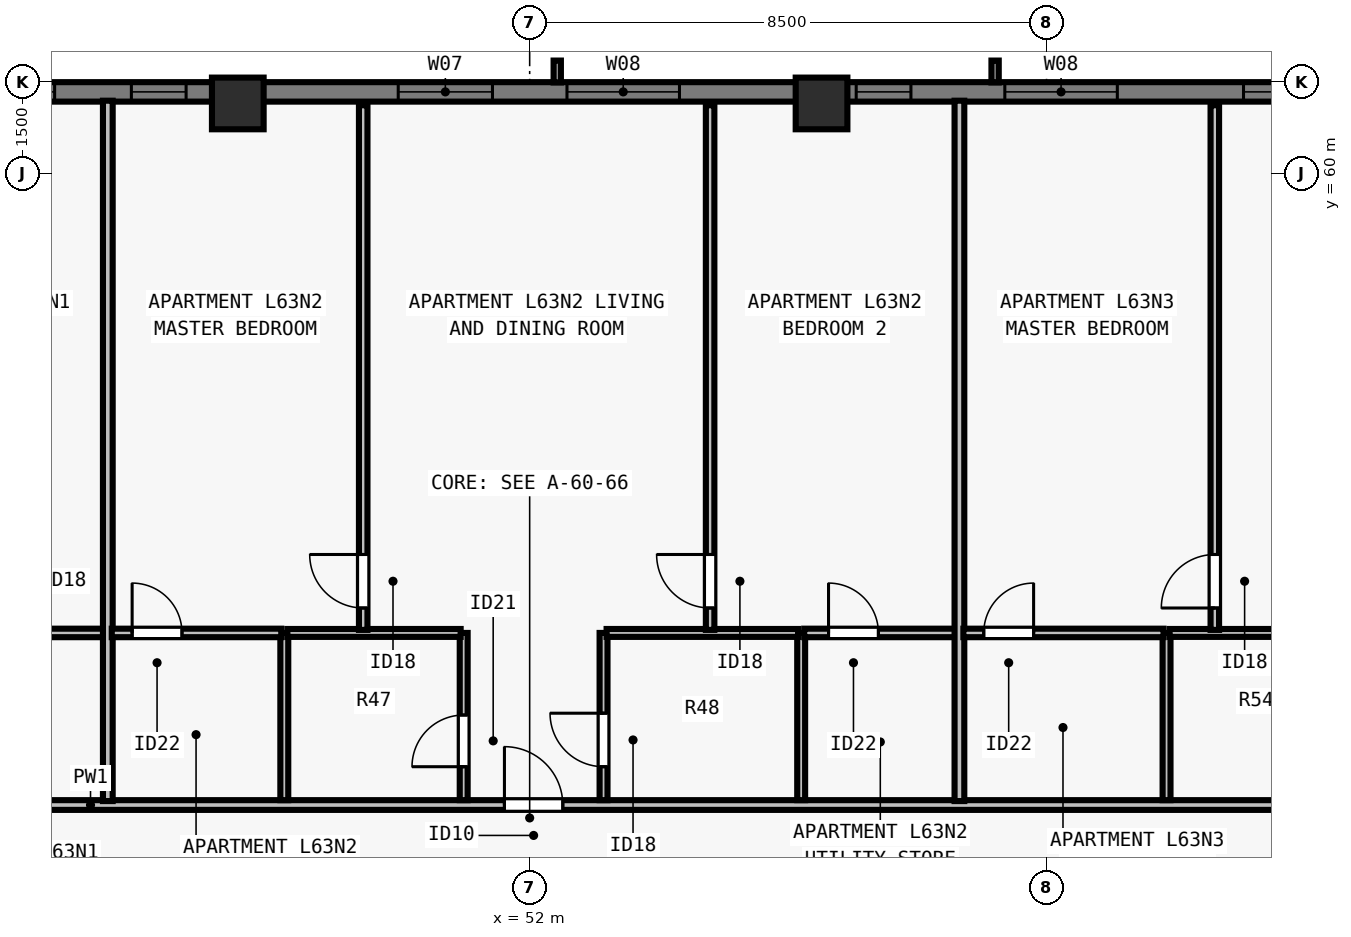
"""IFC4 building model, lengths in metres.
Left out: names, types, materials, properties, quantities, classifications, styles, units other than length and angle.
Written with IfcOpenShell. Run it as: python <this file> out.ifc"""

import sys

from ifc_helpers import new_model, si_unit, direction, frame, frame_2d, origin, origin_2d, place, context, subcontext, project, spatial, rectangle, extrude, element, fill, save


model = new_model("IFC4")
c1 = context("Model", 3, precision=1e-05, world=origin(), true_north=direction((0.0, 1.0)))
c2 = subcontext(c1, "Body", "Model", "MODEL_VIEW")
j1 = project(units=[si_unit("LENGTHUNIT", "METRE"), si_unit("PLANEANGLEUNIT", "RADIAN")], contexts=[c1])
p1 = place(None, origin())
s1 = spatial("IfcSite", under=j1, at=p1, CompositionType="ELEMENT")
p2 = place(p1, origin())
s2 = spatial("IfcBuilding", under=s1, at=p2, CompositionType="ELEMENT")
p3 = place(p2, frame((0.0, 0.0, 230.5)))
s3 = spatial("IfcBuildingStorey", under=s2, at=p3, CompositionType="ELEMENT", Elevation=230.5)
for number, where, z_axis, x_axis in (
    (1, (56.8, 61.15, 0.0), (0.0, 0.0, 1.0), (1.0, 0.0, 0.0)),
    (2, (47.2, 61.15, 0.0), (0.0, 0.0, 1.0), (1.0, 0.0, 0.0)),
):
    element("IfcColumn", number, at=place(p3, frame(where, z_axis=z_axis, x_axis=x_axis)), inside=s3, PredefinedType="COLUMN", context=c2, shape_type="SweptSolid", body=[
        extrude(rectangle(XDim=0.85, YDim=0.85, at=origin_2d()), origin(), (0.0, 0.0, 1.0), 3.5),
    ])
p4 = place(p3, frame((34.5, 61.34, 0.0), z_axis=(0.0, 0.0, 1.0), x_axis=(1.0, 0.0, 0.0)))
e3 = element("IfcWall", 3, at=p4, inside=s3, PredefinedType="SOLIDWALL", context=c2, shape_type="SweptSolid", body=[
    extrude(rectangle(XDim=34.702, YDim=0.32, at=frame_2d((17.351, 0.0))), origin(), (0.0, 0.0, 1.0), 3.29),
])
p5 = place(p4, frame((4.163, 0.0, 0.8)))
e4 = element("IfcOpeningElement", 4, at=p5, cuts=e3, PredefinedType="OPENING", context=c2, shape_type="SweptSolid", body=[
    extrude(rectangle(XDim=1.85, YDim=1.678, at=frame_2d((0.925, 0.839))), frame((0.0, 0.17, 0.0), z_axis=(0.0, -1.0, 0.0), x_axis=(1.0, 0.0, 0.0)), (0.0, 0.0, 1.0), 0.34),
])
p6 = place(p4, frame((8.138, 0.0, 0.8)))
e5 = element("IfcOpeningElement", 5, at=p6, cuts=e3, PredefinedType="OPENING", context=c2, shape_type="SweptSolid", body=[
    extrude(rectangle(XDim=1.55, YDim=1.678, at=frame_2d((0.775, 0.839))), frame((0.0, 0.17, 0.0), z_axis=(0.0, -1.0, 0.0), x_axis=(1.0, 0.0, 0.0)), (0.0, 0.0, 1.0), 0.34),
])
p7 = place(p4, frame((15.338, 0.0, 0.8)))
e6 = element("IfcOpeningElement", 6, at=p7, cuts=e3, PredefinedType="OPENING", context=c2, shape_type="SweptSolid", body=[
    extrude(rectangle(XDim=1.55, YDim=1.678, at=frame_2d((0.775, 0.839))), frame((0.0, 0.17, 0.0), z_axis=(0.0, -1.0, 0.0), x_axis=(1.0, 0.0, 0.0)), (0.0, 0.0, 1.0), 0.34),
])
p8 = place(p4, frame((18.114, 0.0, 0.8)))
e7 = element("IfcOpeningElement", 7, at=p8, cuts=e3, PredefinedType="OPENING", context=c2, shape_type="SweptSolid", body=[
    extrude(rectangle(XDim=1.85, YDim=1.678, at=frame_2d((0.925, 0.839))), frame((0.0, 0.17, 0.0), z_axis=(0.0, -1.0, 0.0), x_axis=(1.0, 0.0, 0.0)), (0.0, 0.0, 1.0), 0.34),
])
p9 = place(p4, frame((25.314, 0.0, 0.8)))
e8 = element("IfcOpeningElement", 8, at=p9, cuts=e3, PredefinedType="OPENING", context=c2, shape_type="SweptSolid", body=[
    extrude(rectangle(XDim=1.85, YDim=1.678, at=frame_2d((0.925, 0.839))), frame((0.0, 0.17, 0.0), z_axis=(0.0, -1.0, 0.0), x_axis=(1.0, 0.0, 0.0)), (0.0, 0.0, 1.0), 0.34),
])
p10 = place(p4, frame((29.24, 0.0, 0.8)))
e9 = element("IfcOpeningElement", 9, at=p10, cuts=e3, PredefinedType="OPENING", context=c2, shape_type="SweptSolid", body=[
    extrude(rectangle(XDim=1.55, YDim=1.678, at=frame_2d((0.775, 0.839))), frame((0.0, 0.17, 0.0), z_axis=(0.0, -1.0, 0.0), x_axis=(1.0, 0.0, 0.0)), (0.0, 0.0, 1.0), 0.34),
])
p11 = place(p4, frame((10.95, 0.0, 0.8)))
e10 = element("IfcOpeningElement", 10, at=p11, cuts=e3, PredefinedType="OPENING", context=c2, shape_type="SweptSolid", body=[
    extrude(rectangle(XDim=0.9, YDim=1.678, at=frame_2d((0.45, 0.839))), frame((0.0, 0.17, 0.0), z_axis=(0.0, -1.0, 0.0), x_axis=(1.0, 0.0, 0.0)), (0.0, 0.0, 1.0), 0.34),
])
p12 = place(p4, frame((22.87, 0.0, 0.8)))
e11 = element("IfcOpeningElement", 11, at=p12, cuts=e3, PredefinedType="OPENING", context=c2, shape_type="SweptSolid", body=[
    extrude(rectangle(XDim=0.9, YDim=1.678, at=frame_2d((0.45, 0.839))), frame((0.0, 0.17, 0.0), z_axis=(0.0, -1.0, 0.0), x_axis=(1.0, 0.0, 0.0)), (0.0, 0.0, 1.0), 0.34),
])
p13 = place(p3, frame((29.77, 49.613, 0.0), z_axis=(0.0, 0.0, 1.0), x_axis=(1.0, 0.0, 0.0)))
e12 = element("IfcWall", 12, at=p13, inside=s3, PredefinedType="PARTITIONING", context=c2, shape_type="SweptSolid", body=[
    extrude(rectangle(XDim=44.425, YDim=0.16, at=frame_2d((22.212, 0.0))), origin(), (0.0, 0.0, 1.0), 2.958),
])
p14 = place(p13, frame((7.241, 0.0, 0.0)))
e13 = element("IfcOpeningElement", 13, at=p14, cuts=e12, PredefinedType="OPENING", context=c2, shape_type="SweptSolid", body=[
    extrude(rectangle(XDim=0.96, YDim=2.18, at=frame_2d((0.48, 1.09))), frame((0.0, 0.09, 0.0), z_axis=(0.0, -1.0, 0.0), x_axis=(1.0, 0.0, 0.0)), (0.0, 0.0, 1.0), 0.18),
])
p15 = place(p13, frame((21.815, 0.0, 0.0)))
e14 = element("IfcOpeningElement", 14, at=p15, cuts=e12, PredefinedType="OPENING", context=c2, shape_type="SweptSolid", body=[
    extrude(rectangle(XDim=0.96, YDim=2.18, at=frame_2d((0.48, 1.09))), frame((0.0, 0.09, 0.0), z_axis=(0.0, -1.0, 0.0), x_axis=(1.0, 0.0, 0.0)), (0.0, 0.0, 1.0), 0.18),
])
p16 = place(p13, frame((36.324, 0.0, 0.0)))
e15 = element("IfcOpeningElement", 15, at=p16, cuts=e12, PredefinedType="OPENING", context=c2, shape_type="SweptSolid", body=[
    extrude(rectangle(XDim=0.96, YDim=2.18, at=frame_2d((0.48, 1.09))), frame((0.0, 0.09, 0.0), z_axis=(0.0, -1.0, 0.0), x_axis=(1.0, 0.0, 0.0)), (0.0, 0.0, 1.0), 0.18),
])
p17 = place(p3, frame((41.941, 52.442, 0.0), z_axis=(0.0, 0.0, 1.0), x_axis=(1.0, 0.0, 0.0)))
e16 = element("IfcWall", 16, at=p17, inside=s3, PredefinedType="PARTITIONING", context=c2, shape_type="SweptSolid", body=[
    extrude(rectangle(XDim=3.171, YDim=0.14, at=frame_2d((1.586, 0.0))), origin(), (0.0, 0.0, 1.0), 3.29),
])
p18 = place(p17, frame((0.4, 0.0, 0.0)))
e17 = element("IfcOpeningElement", 17, at=p18, cuts=e16, PredefinedType="OPENING", context=c2, shape_type="SweptSolid", body=[
    extrude(rectangle(XDim=0.82, YDim=2.1, at=frame_2d((0.41, 1.05))), frame((0.0, 0.08, 0.0), z_axis=(0.0, -1.0, 0.0), x_axis=(1.0, 0.0, 0.0)), (0.0, 0.0, 1.0), 0.16),
])
p19 = place(p3, frame((45.062, 49.677, 0.0), z_axis=(0.0, 0.0, 1.0), x_axis=(0.0, 1.0, 0.0)))
e18 = element("IfcWall", 18, at=p19, inside=s3, PredefinedType="PARTITIONING", context=c2, shape_type="SweptSolid", body=[
    extrude(rectangle(XDim=11.518, YDim=0.16, at=frame_2d((5.759, 0.0))), origin(), (0.0, 0.0, 1.0), 3.29),
])
p20 = place(p3, frame((47.965, 49.692, 0.0), z_axis=(0.0, 0.0, 1.0), x_axis=(0.0, 1.0, 0.0)))
e19 = element("IfcWall", 19, at=p20, inside=s3, PredefinedType="PLUMBINGWALL", context=c2, shape_type="SweptSolid", body=[
    extrude(rectangle(XDim=2.75, YDim=0.13, at=frame_2d((1.375, 0.0))), origin(), (0.0, 0.0, 1.0), 3.29),
])
p21 = place(p3, frame((50.915, 49.692, 0.0), z_axis=(0.0, 0.0, 1.0), x_axis=(0.0, 1.0, 0.0)))
e20 = element("IfcWall", 20, at=p21, inside=s3, PredefinedType="PLUMBINGWALL", context=c2, shape_type="SweptSolid", body=[
    extrude(rectangle(XDim=2.75, YDim=0.13, at=frame_2d((1.375, 0.0))), origin(), (0.0, 0.0, 1.0), 3.29),
])
p22 = place(p21, frame((0.55, 0.0, 0.0)))
e21 = element("IfcOpeningElement", 21, at=p22, cuts=e20, PredefinedType="OPENING", context=c2, shape_type="SweptSolid", body=[
    extrude(rectangle(XDim=0.85, YDim=2.08, at=frame_2d((0.425, 1.04))), frame((0.0, 0.075, 0.0), z_axis=(0.0, -1.0, 0.0), x_axis=(1.0, 0.0, 0.0)), (0.0, 0.0, 1.0), 0.15),
])
p23 = place(p3, frame((48.015, 52.442, 0.0), z_axis=(0.0, 0.0, 1.0), x_axis=(1.0, 0.0, 0.0)))
e22 = element("IfcWall", 22, at=p23, inside=s3, PredefinedType="PLUMBINGWALL", context=c2, shape_type="SweptSolid", body=[
    extrude(rectangle(XDim=2.85, YDim=0.13, at=frame_2d((1.425, 0.0))), origin(), (0.0, 0.0, 1.0), 3.29),
])
p24 = place(p3, frame((56.465, 49.692, 0.0), z_axis=(0.0, 0.0, 1.0), x_axis=(0.0, 1.0, 0.0)))
e23 = element("IfcWall", 23, at=p24, inside=s3, PredefinedType="PLUMBINGWALL", context=c2, shape_type="SweptSolid", body=[
    extrude(rectangle(XDim=2.75, YDim=0.13, at=frame_2d((1.375, 0.0))), origin(), (0.0, 0.0, 1.0), 3.29),
])
p25 = place(p3, frame((53.215, 49.692, 0.0), z_axis=(0.0, 0.0, 1.0), x_axis=(0.0, 1.0, 0.0)))
e24 = element("IfcWall", 24, at=p25, inside=s3, PredefinedType="PLUMBINGWALL", context=c2, shape_type="SweptSolid", body=[
    extrude(rectangle(XDim=2.75, YDim=0.13, at=frame_2d((1.375, 0.0))), origin(), (0.0, 0.0, 1.0), 3.29),
])
p26 = place(p25, frame((0.55, 0.0, 0.0)))
e25 = element("IfcOpeningElement", 25, at=p26, cuts=e24, PredefinedType="OPENING", context=c2, shape_type="SweptSolid", body=[
    extrude(rectangle(XDim=0.88, YDim=2.1, at=frame_2d((0.44, 1.05))), frame((0.0, 0.075, 0.0), z_axis=(0.0, -1.0, 0.0), x_axis=(1.0, 0.0, 0.0)), (0.0, 0.0, 1.0), 0.15),
])
p27 = place(p3, frame((53.265, 52.442, 0.0), z_axis=(0.0, 0.0, 1.0), x_axis=(1.0, 0.0, 0.0)))
e26 = element("IfcWall", 26, at=p27, inside=s3, PredefinedType="PLUMBINGWALL", context=c2, shape_type="SweptSolid", body=[
    extrude(rectangle(XDim=3.15, YDim=0.13, at=frame_2d((1.575, 0.0))), origin(), (0.0, 0.0, 1.0), 3.29),
])
p28 = place(p3, frame((49.262, 52.492, 0.0), z_axis=(0.0, 0.0, 1.0), x_axis=(0.0, 1.0, 0.0)))
e27 = element("IfcWall", 27, at=p28, inside=s3, PredefinedType="PARTITIONING", context=c2, shape_type="SweptSolid", body=[
    extrude(rectangle(XDim=8.628, YDim=0.14, at=frame_2d((4.314, 0.0))), origin(), (0.0, 0.0, 1.0), 3.29),
])
p29 = place(p28, frame((0.36, 0.0, 0.0)))
e28 = element("IfcOpeningElement", 28, at=p29, cuts=e27, PredefinedType="OPENING", context=c2, shape_type="SweptSolid", body=[
    extrude(rectangle(XDim=0.88, YDim=2.1, at=frame_2d((0.44, 1.05))), frame((0.0, 0.08, 0.0), z_axis=(0.0, -1.0, 0.0), x_axis=(1.0, 0.0, 0.0)), (0.0, 0.0, 1.0), 0.16),
])
p30 = place(p3, frame((45.127, 52.442, 0.0), z_axis=(0.0, 0.0, 1.0), x_axis=(1.0, 0.0, 0.0)))
e29 = element("IfcWall", 29, at=p30, inside=s3, PredefinedType="PARTITIONING", context=c2, shape_type="SweptSolid", body=[
    extrude(rectangle(XDim=2.788, YDim=0.14, at=frame_2d((1.394, 0.0))), origin(), (0.0, 0.0, 1.0), 3.29),
])
p31 = place(p30, frame((0.335, 0.0, 0.0)))
e30 = element("IfcOpeningElement", 30, at=p31, cuts=e29, PredefinedType="OPENING", context=c2, shape_type="SweptSolid", body=[
    extrude(rectangle(XDim=0.82, YDim=2.1, at=frame_2d((0.41, 1.05))), frame((0.0, 0.08, 0.0), z_axis=(0.0, -1.0, 0.0), x_axis=(1.0, 0.0, 0.0)), (0.0, 0.0, 1.0), 0.16),
])
p32 = place(p3, frame((54.968, 52.492, 0.0), z_axis=(0.0, 0.0, 1.0), x_axis=(0.0, 1.0, 0.0)))
e31 = element("IfcWall", 31, at=p32, inside=s3, PredefinedType="PARTITIONING", context=c2, shape_type="SweptSolid", body=[
    extrude(rectangle(XDim=8.628, YDim=0.14, at=frame_2d((4.314, 0.0))), origin(), (0.0, 0.0, 1.0), 2.958),
])
p33 = place(p32, frame((0.36, 0.0, 0.0)))
e32 = element("IfcOpeningElement", 32, at=p33, cuts=e31, PredefinedType="OPENING", context=c2, shape_type="SweptSolid", body=[
    extrude(rectangle(XDim=0.88, YDim=2.1, at=frame_2d((0.44, 1.05))), frame((0.0, 0.08, 0.0), z_axis=(0.0, -1.0, 0.0), x_axis=(1.0, 0.0, 0.0)), (0.0, 0.0, 1.0), 0.16),
])
p34 = place(p3, frame((56.515, 52.442, 0.0), z_axis=(0.0, 0.0, 1.0), x_axis=(1.0, 0.0, 0.0)))
e33 = element("IfcWall", 33, at=p34, inside=s3, PredefinedType="PARTITIONING", context=c2, shape_type="SweptSolid", body=[
    extrude(rectangle(XDim=2.603, YDim=0.14, at=frame_2d((1.301, 0.0))), origin(), (0.0, 0.0, 1.0), 3.29),
])
p35 = place(p34, frame((0.4, 0.0, 0.0)))
e34 = element("IfcOpeningElement", 34, at=p35, cuts=e33, PredefinedType="OPENING", context=c2, shape_type="SweptSolid", body=[
    extrude(rectangle(XDim=0.82, YDim=2.1, at=frame_2d((0.41, 1.05))), frame((0.0, 0.08, 0.0), z_axis=(0.0, -1.0, 0.0), x_axis=(1.0, 0.0, 0.0)), (0.0, 0.0, 1.0), 0.16),
])
p36 = place(p3, frame((59.067, 49.677, 0.0), z_axis=(0.0, 0.0, 1.0), x_axis=(0.0, 1.0, 0.0)))
e35 = element("IfcWall", 35, at=p36, inside=s3, PredefinedType="PARTITIONING", context=c2, shape_type="SweptSolid", body=[
    extrude(rectangle(XDim=11.518, YDim=0.16, at=frame_2d((5.759, 0.0))), origin(), (0.0, 0.0, 1.0), 3.29),
])
p37 = place(p3, frame((62.474, 49.692, 0.0), z_axis=(0.0, 0.0, 1.0), x_axis=(0.0, 1.0, 0.0)))
e36 = element("IfcWall", 36, at=p37, inside=s3, PredefinedType="PLUMBINGWALL", context=c2, shape_type="SweptSolid", body=[
    extrude(rectangle(XDim=2.75, YDim=0.13, at=frame_2d((1.375, 0.0))), origin(), (0.0, 0.0, 1.0), 2.573),
])
p38 = place(p3, frame((62.524, 52.442, 0.0), z_axis=(0.0, 0.0, 1.0), x_axis=(1.0, 0.0, 0.0)))
e37 = element("IfcWall", 37, at=p38, inside=s3, PredefinedType="PLUMBINGWALL", context=c2, shape_type="SweptSolid", body=[
    extrude(rectangle(XDim=2.85, YDim=0.13, at=frame_2d((1.425, 0.0))), origin(), (0.0, 0.0, 1.0), 3.29),
])
p39 = place(p3, frame((63.268, 52.492, 0.0), z_axis=(0.0, 0.0, 1.0), x_axis=(0.0, 1.0, 0.0)))
e38 = element("IfcWall", 38, at=p39, inside=s3, PredefinedType="PARTITIONING", context=c2, shape_type="SweptSolid", body=[
    extrude(rectangle(XDim=8.628, YDim=0.14, at=frame_2d((4.314, 0.0))), origin(), (0.0, 0.0, 1.0), 3.29),
])
p40 = place(p39, frame((0.36, 0.0, 0.0)))
e39 = element("IfcOpeningElement", 39, at=p40, cuts=e38, PredefinedType="OPENING", context=c2, shape_type="SweptSolid", body=[
    extrude(rectangle(XDim=0.88, YDim=2.1, at=frame_2d((0.44, 1.05))), frame((0.0, 0.08, 0.0), z_axis=(0.0, -1.0, 0.0), x_axis=(1.0, 0.0, 0.0)), (0.0, 0.0, 1.0), 0.16),
])
p41 = place(p3, frame((59.133, 52.442, 0.0), z_axis=(0.0, 0.0, 1.0), x_axis=(1.0, 0.0, 0.0)))
e40 = element("IfcWall", 40, at=p41, inside=s3, PredefinedType="PARTITIONING", context=c2, shape_type="SweptSolid", body=[
    extrude(rectangle(XDim=3.291, YDim=0.14, at=frame_2d((1.646, 0.0))), origin(), (0.0, 0.0, 1.0), 3.29),
])
p42 = place(p41, frame((0.335, 0.0, 0.0)))
e41 = element("IfcOpeningElement", 41, at=p42, cuts=e40, PredefinedType="OPENING", context=c2, shape_type="SweptSolid", body=[
    extrude(rectangle(XDim=0.82, YDim=2.1, at=frame_2d((0.41, 1.05))), frame((0.0, 0.08, 0.0), z_axis=(0.0, -1.0, 0.0), x_axis=(1.0, 0.0, 0.0)), (0.0, 0.0, 1.0), 0.16),
])
p43 = place(p6, origin())
e42 = element("IfcWindow", 42, at=p43, inside=s3, PartitioningType="SINGLE_PANEL", PredefinedType="WINDOW", context=c2, shape_type="SweptSolid", body=[
    extrude(rectangle(XDim=1.55, YDim=1.678, at=frame_2d((0.775, 0.839))), frame((0.0, -0.05, 0.0), z_axis=(0.0, -1.0, 0.0), x_axis=(1.0, 0.0, 0.0)), (0.0, 0.0, 1.0), 0.06),
])
fill(e5, e42)
p44 = place(p7, origin())
e43 = element("IfcWindow", 43, at=p44, inside=s3, PartitioningType="SINGLE_PANEL", PredefinedType="WINDOW", context=c2, shape_type="SweptSolid", body=[
    extrude(rectangle(XDim=1.55, YDim=1.678, at=frame_2d((0.775, 0.839))), frame((0.0, -0.05, 0.0), z_axis=(0.0, -1.0, 0.0), x_axis=(1.0, 0.0, 0.0)), (0.0, 0.0, 1.0), 0.06),
])
fill(e6, e43)
p45 = place(p8, origin())
e44 = element("IfcWindow", 44, at=p45, inside=s3, PartitioningType="SINGLE_PANEL", PredefinedType="WINDOW", context=c2, shape_type="SweptSolid", body=[
    extrude(rectangle(XDim=1.85, YDim=1.678, at=frame_2d((0.925, 0.839))), frame((0.0, -0.05, 0.0), z_axis=(0.0, -1.0, 0.0), x_axis=(1.0, 0.0, 0.0)), (0.0, 0.0, 1.0), 0.06),
])
fill(e7, e44)
p46 = place(p9, origin())
e45 = element("IfcWindow", 45, at=p46, inside=s3, PartitioningType="SINGLE_PANEL", PredefinedType="WINDOW", context=c2, shape_type="SweptSolid", body=[
    extrude(rectangle(XDim=1.85, YDim=1.678, at=frame_2d((0.925, 0.839))), frame((0.0, -0.05, 0.0), z_axis=(0.0, -1.0, 0.0), x_axis=(1.0, 0.0, 0.0)), (0.0, 0.0, 1.0), 0.06),
])
fill(e8, e45)
p47 = place(p10, origin())
e46 = element("IfcWindow", 46, at=p47, inside=s3, PartitioningType="SINGLE_PANEL", PredefinedType="WINDOW", context=c2, shape_type="SweptSolid", body=[
    extrude(rectangle(XDim=1.55, YDim=1.678, at=frame_2d((0.775, 0.839))), frame((0.0, -0.05, 0.0), z_axis=(0.0, -1.0, 0.0), x_axis=(1.0, 0.0, 0.0)), (0.0, 0.0, 1.0), 0.06),
])
fill(e9, e46)
p48 = place(p11, origin())
e47 = element("IfcWindow", 47, at=p48, inside=s3, PartitioningType="SINGLE_PANEL", PredefinedType="WINDOW", context=c2, shape_type="SweptSolid", body=[
    extrude(rectangle(XDim=0.9, YDim=1.678, at=frame_2d((0.45, 0.839))), frame((0.0, -0.04, 0.0), z_axis=(0.0, -1.0, 0.0), x_axis=(1.0, 0.0, 0.0)), (0.0, 0.0, 1.0), 0.06),
])
fill(e10, e47)
p49 = place(p12, origin())
e48 = element("IfcWindow", 48, at=p49, inside=s3, PartitioningType="SINGLE_PANEL", PredefinedType="WINDOW", context=c2, shape_type="SweptSolid", body=[
    extrude(rectangle(XDim=0.9, YDim=1.678, at=frame_2d((0.45, 0.839))), frame((0.0, -0.04, 0.0), z_axis=(0.0, -1.0, 0.0), x_axis=(1.0, 0.0, 0.0)), (0.0, 0.0, 1.0), 0.06),
])
fill(e11, e48)
p50 = place(p22, origin())
e49 = element("IfcDoor", 49, at=p50, inside=s3, OperationType="SINGLE_SWING_LEFT", PredefinedType="DOOR", context=c2, shape_type="SweptSolid", body=[
    extrude(rectangle(XDim=0.85, YDim=2.08, at=frame_2d((0.425, 1.04))), frame((0.0, 0.025, 0.0), z_axis=(0.0, -1.0, 0.0), x_axis=(1.0, 0.0, 0.0)), (0.0, 0.0, 1.0), 0.05),
])
fill(e21, e49)
p51 = place(p26, origin())
e50 = element("IfcDoor", 50, at=p51, inside=s3, OperationType="SINGLE_SWING_RIGHT", PredefinedType="DOOR", context=c2, shape_type="SweptSolid", body=[
    extrude(rectangle(XDim=0.88, YDim=2.1, at=frame_2d((0.44, 1.05))), frame((0.0, 0.025, 0.0), z_axis=(0.0, -1.0, 0.0), x_axis=(1.0, 0.0, 0.0)), (0.0, 0.0, 1.0), 0.05),
])
fill(e25, e50)
p52 = place(p31, origin())
e51 = element("IfcDoor", 51, at=p52, inside=s3, OperationType="SINGLE_SWING_LEFT", PredefinedType="DOOR", context=c2, shape_type="SweptSolid", body=[
    extrude(rectangle(XDim=0.82, YDim=2.1, at=frame_2d((0.41, 1.05))), frame((0.0, 0.025, 0.0), z_axis=(0.0, -1.0, 0.0), x_axis=(1.0, 0.0, 0.0)), (0.0, 0.0, 1.0), 0.05),
])
fill(e30, e51)
p53 = place(p29, origin())
e52 = element("IfcDoor", 52, at=p53, inside=s3, OperationType="SINGLE_SWING_RIGHT", PredefinedType="DOOR", context=c2, shape_type="SweptSolid", body=[
    extrude(rectangle(XDim=0.88, YDim=2.1, at=frame_2d((0.44, 1.05))), frame((0.0, 0.025, 0.0), z_axis=(0.0, -1.0, 0.0), x_axis=(1.0, 0.0, 0.0)), (0.0, 0.0, 1.0), 0.05),
])
fill(e28, e52)
p54 = place(p35, origin())
e53 = element("IfcDoor", 53, at=p54, inside=s3, OperationType="SINGLE_SWING_LEFT", PredefinedType="DOOR", context=c2, shape_type="SweptSolid", body=[
    extrude(rectangle(XDim=0.82, YDim=2.1, at=frame_2d((0.41, 1.05))), frame((0.0, 0.025, 0.0), z_axis=(0.0, -1.0, 0.0), x_axis=(1.0, 0.0, 0.0)), (0.0, 0.0, 1.0), 0.05),
])
fill(e34, e53)
p55 = place(p33, origin())
e54 = element("IfcDoor", 54, at=p55, inside=s3, OperationType="SINGLE_SWING_RIGHT", PredefinedType="DOOR", context=c2, shape_type="SweptSolid", body=[
    extrude(rectangle(XDim=0.88, YDim=2.1, at=frame_2d((0.44, 1.05))), frame((0.0, 0.025, 0.0), z_axis=(0.0, -1.0, 0.0), x_axis=(1.0, 0.0, 0.0)), (0.0, 0.0, 1.0), 0.05),
])
fill(e32, e54)
p56 = place(p15, origin())
e55 = element("IfcDoor", 55, at=p56, inside=s3, OperationType="SINGLE_SWING_LEFT", PredefinedType="DOOR", context=c2, shape_type="SweptSolid", body=[
    extrude(rectangle(XDim=0.96, YDim=2.18, at=frame_2d((0.48, 1.09))), frame((0.0, 0.025, 0.0), z_axis=(0.0, -1.0, 0.0), x_axis=(1.0, 0.0, 0.0)), (0.0, 0.0, 1.0), 0.05),
])
fill(e14, e55)
p57 = place(p42, origin())
e56 = element("IfcDoor", 56, at=p57, inside=s3, OperationType="SINGLE_SWING_RIGHT", PredefinedType="DOOR", context=c2, shape_type="SweptSolid", body=[
    extrude(rectangle(XDim=0.82, YDim=2.1, at=frame_2d((0.41, 1.05))), frame((0.0, 0.025, 0.0), z_axis=(0.0, -1.0, 0.0), x_axis=(1.0, 0.0, 0.0)), (0.0, 0.0, 1.0), 0.05),
])
fill(e41, e56)
p58 = place(p40, origin())
e57 = element("IfcDoor", 57, at=p58, inside=s3, OperationType="SINGLE_SWING_LEFT", PredefinedType="DOOR", context=c2, shape_type="SweptSolid", body=[
    extrude(rectangle(XDim=0.88, YDim=2.1, at=frame_2d((0.44, 1.05))), frame((0.0, 0.025, 0.0), z_axis=(0.0, -1.0, 0.0), x_axis=(1.0, 0.0, 0.0)), (0.0, 0.0, 1.0), 0.05),
])
fill(e39, e57)
save(model, sys.argv[1])
